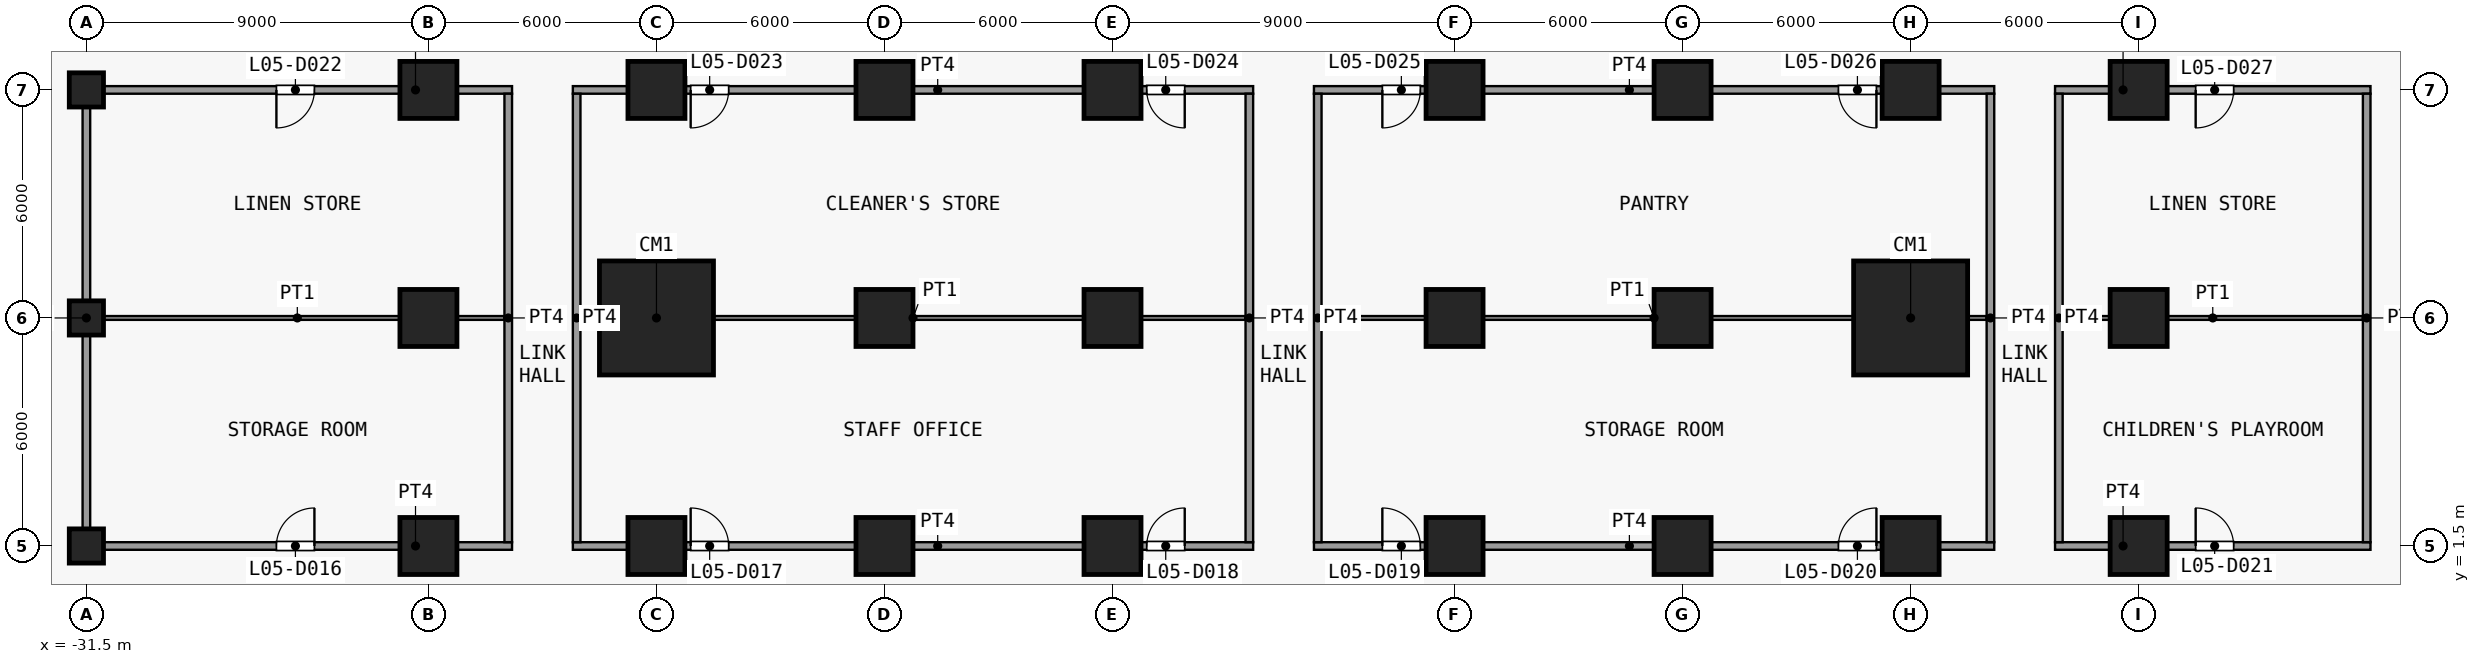
"""IFC4 building model, lengths in metres.
Left out: names, types, materials, properties, quantities, classifications, styles, units other than length and angle.
Written with IfcOpenShell. Run it as: python <this file> out.ifc"""

import sys

from ifc_helpers import new_model, si_unit, direction, frame, frame_2d, origin, origin_2d, place, context, subcontext, project, spatial, rectangle, extrude, element, fill, save


model = new_model("IFC4")
c1 = context("Model", 3, precision=1e-05, world=origin(), true_north=direction((0.0, 1.0)))
c2 = subcontext(c1, "Body", "Model", "MODEL_VIEW")
j1 = project(units=[si_unit("LENGTHUNIT", "METRE"), si_unit("PLANEANGLEUNIT", "RADIAN")], contexts=[c1])
p1 = place(None, origin())
s1 = spatial("IfcSite", under=j1, at=p1, CompositionType="ELEMENT")
p2 = place(p1, origin())
s2 = spatial("IfcBuilding", under=s1, at=p2, CompositionType="ELEMENT")
p3 = place(p2, frame((0.0, 0.0, 28.0)))
s3 = spatial("IfcBuildingStorey", under=s2, at=p3, CompositionType="ELEMENT", Elevation=28.0)
for number, where, z_axis, x_axis in (
    (1, (-31.5, 1.5, 0.0), (0.0, 0.0, 1.0), (1.0, 0.0, 0.0)),
    (2, (-31.5, 7.5, 0.0), (0.0, 0.0, 1.0), (1.0, 0.0, 0.0)),
    (3, (-31.5, 13.5, 0.0), (0.0, 0.0, 1.0), (1.0, 0.0, 0.0)),
):
    element("IfcColumn", number, at=place(p3, frame(where, z_axis=z_axis, x_axis=x_axis)), inside=s3, PredefinedType="COLUMN", context=c2, shape_type="SweptSolid", body=[
        extrude(rectangle(XDim=0.9, YDim=0.9, at=origin_2d()), origin(), (0.0, 0.0, 1.0), 4.5),
    ])
for number, where, z_axis, x_axis in (
    (4, (-22.5, 1.5, 0.0), (0.0, 0.0, 1.0), (1.0, 0.0, 0.0)),
    (5, (-22.5, 7.5, 0.0), (0.0, 0.0, 1.0), (1.0, 0.0, 0.0)),
    (6, (-22.5, 13.5, 0.0), (0.0, 0.0, 1.0), (1.0, 0.0, 0.0)),
    (7, (-16.5, 1.5, 0.0), (0.0, 0.0, 1.0), (1.0, 0.0, 0.0)),
):
    element("IfcColumn", number, at=place(p3, frame(where, z_axis=z_axis, x_axis=x_axis)), inside=s3, PredefinedType="COLUMN", context=c2, shape_type="SweptSolid", body=[
        extrude(rectangle(XDim=1.5, YDim=1.5, at=origin_2d()), origin(), (0.0, 0.0, 1.0), 4.5),
    ])
p4 = place(p3, frame((-16.5, 7.5, 0.0), z_axis=(0.0, 0.0, 1.0), x_axis=(1.0, 0.0, 0.0)))
e8 = element("IfcColumn", 8, at=p4, inside=s3, PredefinedType="COLUMN", context=c2, shape_type="SweptSolid", body=[
    extrude(rectangle(XDim=3.0, YDim=3.0, at=origin_2d()), origin(), (0.0, 0.0, 1.0), 4.5),
])
for number, where, z_axis, x_axis in (
    (9, (-16.5, 13.5, 0.0), (0.0, 0.0, 1.0), (1.0, 0.0, 0.0)),
    (10, (-10.5, 1.5, 0.0), (0.0, 0.0, 1.0), (1.0, 0.0, 0.0)),
    (11, (-10.5, 7.5, 0.0), (0.0, 0.0, 1.0), (1.0, 0.0, 0.0)),
    (12, (-10.5, 13.5, 0.0), (0.0, 0.0, 1.0), (1.0, 0.0, 0.0)),
    (13, (-4.5, 1.5, 0.0), (0.0, 0.0, 1.0), (1.0, 0.0, 0.0)),
    (14, (-4.5, 7.5, 0.0), (0.0, 0.0, 1.0), (1.0, 0.0, 0.0)),
    (15, (-4.5, 13.5, 0.0), (0.0, 0.0, 1.0), (1.0, 0.0, 0.0)),
    (16, (4.5, 1.5, 0.0), (0.0, 0.0, 1.0), (1.0, 0.0, 0.0)),
    (17, (4.5, 7.5, 0.0), (0.0, 0.0, 1.0), (1.0, 0.0, 0.0)),
    (18, (4.5, 13.5, 0.0), (0.0, 0.0, 1.0), (1.0, 0.0, 0.0)),
    (19, (10.5, 1.5, 0.0), (0.0, 0.0, 1.0), (1.0, 0.0, 0.0)),
    (20, (10.5, 7.5, 0.0), (0.0, 0.0, 1.0), (1.0, 0.0, 0.0)),
    (21, (10.5, 13.5, 0.0), (0.0, 0.0, 1.0), (1.0, 0.0, 0.0)),
    (22, (16.5, 1.5, 0.0), (0.0, 0.0, 1.0), (1.0, 0.0, 0.0)),
):
    element("IfcColumn", number, at=place(p3, frame(where, z_axis=z_axis, x_axis=x_axis)), inside=s3, PredefinedType="COLUMN", context=c2, shape_type="SweptSolid", body=[
        extrude(rectangle(XDim=1.5, YDim=1.5, at=origin_2d()), origin(), (0.0, 0.0, 1.0), 4.5),
    ])
p5 = place(p3, frame((16.5, 7.5, 0.0), z_axis=(0.0, 0.0, 1.0), x_axis=(1.0, 0.0, 0.0)))
e23 = element("IfcColumn", 23, at=p5, inside=s3, PredefinedType="COLUMN", context=c2, shape_type="SweptSolid", body=[
    extrude(rectangle(XDim=3.0, YDim=3.0, at=origin_2d()), origin(), (0.0, 0.0, 1.0), 4.5),
])
for number, where, z_axis, x_axis in (
    (24, (16.5, 13.5, 0.0), (0.0, 0.0, 1.0), (1.0, 0.0, 0.0)),
    (25, (22.5, 1.5, 0.0), (0.0, 0.0, 1.0), (1.0, 0.0, 0.0)),
    (26, (22.5, 7.5, 0.0), (0.0, 0.0, 1.0), (1.0, 0.0, 0.0)),
    (27, (22.5, 13.5, 0.0), (0.0, 0.0, 1.0), (1.0, 0.0, 0.0)),
):
    element("IfcColumn", number, at=place(p3, frame(where, z_axis=z_axis, x_axis=x_axis)), inside=s3, PredefinedType="COLUMN", context=c2, shape_type="SweptSolid", body=[
        extrude(rectangle(XDim=1.5, YDim=1.5, at=origin_2d()), origin(), (0.0, 0.0, 1.0), 4.5),
    ])
p6 = place(p3, frame((-31.6, 1.5, 0.0), z_axis=(0.0, 0.0, 1.0), x_axis=(1.0, 0.0, 0.0)))
e28 = element("IfcWall", 28, at=p6, inside=s3, PredefinedType="PARTITIONING", context=c2, shape_type="SweptSolid", body=[
    extrude(rectangle(XDim=11.3, YDim=0.2, at=frame_2d((5.65, 0.0))), origin(), (0.0, 0.0, 1.0), 4.1),
])
p7 = place(p6, frame((5.1, 0.0, 0.0)))
e29 = element("IfcOpeningElement", 29, at=p7, cuts=e28, PredefinedType="OPENING", context=c2, shape_type="SweptSolid", body=[
    extrude(rectangle(XDim=1.0, YDim=2.1, at=frame_2d((0.5, 1.05))), frame((0.0, 0.11, 0.0), z_axis=(0.0, -1.0, 0.0), x_axis=(1.0, 0.0, 0.0)), (0.0, 0.0, 1.0), 0.22),
])
p8 = place(p3, frame((-18.7, 1.5, 0.0), z_axis=(0.0, 0.0, 1.0), x_axis=(1.0, 0.0, 0.0)))
e30 = element("IfcWall", 30, at=p8, inside=s3, PredefinedType="PARTITIONING", context=c2, shape_type="SweptSolid", body=[
    extrude(rectangle(XDim=17.9, YDim=0.2, at=frame_2d((8.95, 0.0))), origin(), (0.0, 0.0, 1.0), 4.1),
])
p9 = place(p8, frame((3.1, 0.0, 0.0)))
e31 = element("IfcOpeningElement", 31, at=p9, cuts=e30, PredefinedType="OPENING", context=c2, shape_type="SweptSolid", body=[
    extrude(rectangle(XDim=1.0, YDim=2.1, at=frame_2d((0.5, 1.05))), frame((0.0, 0.11, 0.0), z_axis=(0.0, -1.0, 0.0), x_axis=(1.0, 0.0, 0.0)), (0.0, 0.0, 1.0), 0.22),
])
p10 = place(p8, frame((15.1, 0.0, 0.0)))
e32 = element("IfcOpeningElement", 32, at=p10, cuts=e30, PredefinedType="OPENING", context=c2, shape_type="SweptSolid", body=[
    extrude(rectangle(XDim=1.0, YDim=2.1, at=frame_2d((0.5, 1.05))), frame((0.0, 0.11, 0.0), z_axis=(0.0, -1.0, 0.0), x_axis=(1.0, 0.0, 0.0)), (0.0, 0.0, 1.0), 0.22),
])
p11 = place(p3, frame((0.8, 1.5, 0.0), z_axis=(0.0, 0.0, 1.0), x_axis=(1.0, 0.0, 0.0)))
e33 = element("IfcWall", 33, at=p11, inside=s3, PredefinedType="PARTITIONING", context=c2, shape_type="SweptSolid", body=[
    extrude(rectangle(XDim=17.9, YDim=0.2, at=frame_2d((8.95, 0.0))), origin(), (0.0, 0.0, 1.0), 4.1),
])
p12 = place(p11, frame((1.8, 0.0, 0.0)))
e34 = element("IfcOpeningElement", 34, at=p12, cuts=e33, PredefinedType="OPENING", context=c2, shape_type="SweptSolid", body=[
    extrude(rectangle(XDim=1.0, YDim=2.1, at=frame_2d((0.5, 1.05))), frame((0.0, 0.11, 0.0), z_axis=(0.0, -1.0, 0.0), x_axis=(1.0, 0.0, 0.0)), (0.0, 0.0, 1.0), 0.22),
])
p13 = place(p11, frame((13.8, 0.0, 0.0)))
e35 = element("IfcOpeningElement", 35, at=p13, cuts=e33, PredefinedType="OPENING", context=c2, shape_type="SweptSolid", body=[
    extrude(rectangle(XDim=1.0, YDim=2.1, at=frame_2d((0.5, 1.05))), frame((0.0, 0.11, 0.0), z_axis=(0.0, -1.0, 0.0), x_axis=(1.0, 0.0, 0.0)), (0.0, 0.0, 1.0), 0.22),
])
p14 = place(p3, frame((20.3, 1.5, 0.0), z_axis=(0.0, 0.0, 1.0), x_axis=(1.0, 0.0, 0.0)))
e36 = element("IfcWall", 36, at=p14, inside=s3, PredefinedType="PARTITIONING", context=c2, shape_type="SweptSolid", body=[
    extrude(rectangle(XDim=8.3, YDim=0.2, at=frame_2d((4.15, 0.0))), origin(), (0.0, 0.0, 1.0), 4.1),
])
p15 = place(p14, frame((3.7, 0.0, 0.0)))
e37 = element("IfcOpeningElement", 37, at=p15, cuts=e36, PredefinedType="OPENING", context=c2, shape_type="SweptSolid", body=[
    extrude(rectangle(XDim=1.0, YDim=2.1, at=frame_2d((0.5, 1.05))), frame((0.0, 0.11, 0.0), z_axis=(0.0, -1.0, 0.0), x_axis=(1.0, 0.0, 0.0)), (0.0, 0.0, 1.0), 0.22),
])
p16 = place(p3, frame((-31.4, 7.5, 0.0), z_axis=(0.0, 0.0, 1.0), x_axis=(1.0, 0.0, 0.0)))
e38 = element("IfcWall", 38, at=p16, inside=s3, PredefinedType="PARTITIONING", context=c2, shape_type="SweptSolid", body=[
    extrude(rectangle(XDim=10.9, YDim=0.1, at=frame_2d((5.45, 0.0))), origin(), (0.0, 0.0, 1.0), 4.1),
])
for number, where, z_axis, x_axis in (
    (39, (-18.5, 7.5, 0.0), (0.0, 0.0, 1.0), (1.0, 0.0, 0.0)),
    (40, (1.0, 7.5, 0.0), (0.0, 0.0, 1.0), (1.0, 0.0, 0.0)),
):
    element("IfcWall", number, at=place(p3, frame(where, z_axis=z_axis, x_axis=x_axis)), inside=s3, PredefinedType="PARTITIONING", context=c2, shape_type="SweptSolid", body=[
        extrude(rectangle(XDim=17.5, YDim=0.1, at=frame_2d((8.75, 0.0))), origin(), (0.0, 0.0, 1.0), 4.1),
    ])
p17 = place(p3, frame((20.5, 7.5, 0.0), z_axis=(0.0, 0.0, 1.0), x_axis=(1.0, 0.0, 0.0)))
e41 = element("IfcWall", 41, at=p17, inside=s3, PredefinedType="PARTITIONING", context=c2, shape_type="SweptSolid", body=[
    extrude(rectangle(XDim=7.9, YDim=0.1, at=frame_2d((3.95, 0.0))), origin(), (0.0, 0.0, 1.0), 4.1),
])
p18 = place(p3, frame((-31.6, 13.5, 0.0), z_axis=(0.0, 0.0, 1.0), x_axis=(1.0, 0.0, 0.0)))
e42 = element("IfcWall", 42, at=p18, inside=s3, PredefinedType="PARTITIONING", context=c2, shape_type="SweptSolid", body=[
    extrude(rectangle(XDim=11.3, YDim=0.2, at=frame_2d((5.65, 0.0))), origin(), (0.0, 0.0, 1.0), 4.1),
])
p19 = place(p18, frame((5.1, 0.0, 0.0)))
e43 = element("IfcOpeningElement", 43, at=p19, cuts=e42, PredefinedType="OPENING", context=c2, shape_type="SweptSolid", body=[
    extrude(rectangle(XDim=1.0, YDim=2.1, at=frame_2d((0.5, 1.05))), frame((0.0, 0.11, 0.0), z_axis=(0.0, -1.0, 0.0), x_axis=(1.0, 0.0, 0.0)), (0.0, 0.0, 1.0), 0.22),
])
p20 = place(p3, frame((-18.7, 13.5, 0.0), z_axis=(0.0, 0.0, 1.0), x_axis=(1.0, 0.0, 0.0)))
e44 = element("IfcWall", 44, at=p20, inside=s3, PredefinedType="PARTITIONING", context=c2, shape_type="SweptSolid", body=[
    extrude(rectangle(XDim=17.9, YDim=0.2, at=frame_2d((8.95, 0.0))), origin(), (0.0, 0.0, 1.0), 4.1),
])
p21 = place(p20, frame((3.1, 0.0, 0.0)))
e45 = element("IfcOpeningElement", 45, at=p21, cuts=e44, PredefinedType="OPENING", context=c2, shape_type="SweptSolid", body=[
    extrude(rectangle(XDim=1.0, YDim=2.1, at=frame_2d((0.5, 1.05))), frame((0.0, 0.11, 0.0), z_axis=(0.0, -1.0, 0.0), x_axis=(1.0, 0.0, 0.0)), (0.0, 0.0, 1.0), 0.22),
])
p22 = place(p20, frame((15.1, 0.0, 0.0)))
e46 = element("IfcOpeningElement", 46, at=p22, cuts=e44, PredefinedType="OPENING", context=c2, shape_type="SweptSolid", body=[
    extrude(rectangle(XDim=1.0, YDim=2.1, at=frame_2d((0.5, 1.05))), frame((0.0, 0.11, 0.0), z_axis=(0.0, -1.0, 0.0), x_axis=(1.0, 0.0, 0.0)), (0.0, 0.0, 1.0), 0.22),
])
p23 = place(p3, frame((0.8, 13.5, 0.0), z_axis=(0.0, 0.0, 1.0), x_axis=(1.0, 0.0, 0.0)))
e47 = element("IfcWall", 47, at=p23, inside=s3, PredefinedType="PARTITIONING", context=c2, shape_type="SweptSolid", body=[
    extrude(rectangle(XDim=17.9, YDim=0.2, at=frame_2d((8.95, 0.0))), origin(), (0.0, 0.0, 1.0), 4.1),
])
p24 = place(p23, frame((1.8, 0.0, 0.0)))
e48 = element("IfcOpeningElement", 48, at=p24, cuts=e47, PredefinedType="OPENING", context=c2, shape_type="SweptSolid", body=[
    extrude(rectangle(XDim=1.0, YDim=2.1, at=frame_2d((0.5, 1.05))), frame((0.0, 0.11, 0.0), z_axis=(0.0, -1.0, 0.0), x_axis=(1.0, 0.0, 0.0)), (0.0, 0.0, 1.0), 0.22),
])
p25 = place(p23, frame((13.8, 0.0, 0.0)))
e49 = element("IfcOpeningElement", 49, at=p25, cuts=e47, PredefinedType="OPENING", context=c2, shape_type="SweptSolid", body=[
    extrude(rectangle(XDim=1.0, YDim=2.1, at=frame_2d((0.5, 1.05))), frame((0.0, 0.11, 0.0), z_axis=(0.0, -1.0, 0.0), x_axis=(1.0, 0.0, 0.0)), (0.0, 0.0, 1.0), 0.22),
])
p26 = place(p3, frame((20.3, 13.5, 0.0), z_axis=(0.0, 0.0, 1.0), x_axis=(1.0, 0.0, 0.0)))
e50 = element("IfcWall", 50, at=p26, inside=s3, PredefinedType="PARTITIONING", context=c2, shape_type="SweptSolid", body=[
    extrude(rectangle(XDim=8.3, YDim=0.2, at=frame_2d((4.15, 0.0))), origin(), (0.0, 0.0, 1.0), 4.1),
])
p27 = place(p26, frame((3.7, 0.0, 0.0)))
e51 = element("IfcOpeningElement", 51, at=p27, cuts=e50, PredefinedType="OPENING", context=c2, shape_type="SweptSolid", body=[
    extrude(rectangle(XDim=1.0, YDim=2.1, at=frame_2d((0.5, 1.05))), frame((0.0, 0.11, 0.0), z_axis=(0.0, -1.0, 0.0), x_axis=(1.0, 0.0, 0.0)), (0.0, 0.0, 1.0), 0.22),
])
for number, where, z_axis, x_axis in (
    (52, (-31.5, 1.6, 0.0), (0.0, 0.0, 1.0), (0.0, 1.0, 0.0)),
    (53, (-20.4, 1.6, 0.0), (0.0, 0.0, 1.0), (0.0, 1.0, 0.0)),
    (54, (-18.6, 1.6, 0.0), (0.0, 0.0, 1.0), (0.0, 1.0, 0.0)),
    (55, (-0.9, 1.6, 0.0), (0.0, 0.0, 1.0), (0.0, 1.0, 0.0)),
    (56, (0.9, 1.6, 0.0), (0.0, 0.0, 1.0), (0.0, 1.0, 0.0)),
    (57, (18.6, 1.6, 0.0), (0.0, 0.0, 1.0), (0.0, 1.0, 0.0)),
    (58, (20.4, 1.6, 0.0), (0.0, 0.0, 1.0), (0.0, 1.0, 0.0)),
    (59, (28.5, 1.6, 0.0), (0.0, 0.0, 1.0), (0.0, 1.0, 0.0)),
):
    element("IfcWall", number, at=place(p3, frame(where, z_axis=z_axis, x_axis=x_axis)), inside=s3, PredefinedType="PARTITIONING", context=c2, shape_type="SweptSolid", body=[
        extrude(rectangle(XDim=11.8, YDim=0.2, at=frame_2d((5.9, 0.0))), origin(), (0.0, 0.0, 1.0), 4.1),
    ])
p28 = place(p7, origin())
e60 = element("IfcDoor", 60, at=p28, inside=s3, OperationType="SINGLE_SWING_LEFT", PredefinedType="DOOR", context=c2, shape_type="SweptSolid", body=[
    extrude(rectangle(XDim=1.0, YDim=2.1, at=frame_2d((0.5, 1.05))), frame((0.0, 0.025, 0.0), z_axis=(0.0, -1.0, 0.0), x_axis=(1.0, 0.0, 0.0)), (0.0, 0.0, 1.0), 0.05),
])
fill(e29, e60)
p29 = place(p9, origin())
e61 = element("IfcDoor", 61, at=p29, inside=s3, OperationType="SINGLE_SWING_RIGHT", PredefinedType="DOOR", context=c2, shape_type="SweptSolid", body=[
    extrude(rectangle(XDim=1.0, YDim=2.1, at=frame_2d((0.5, 1.05))), frame((0.0, 0.025, 0.0), z_axis=(0.0, -1.0, 0.0), x_axis=(1.0, 0.0, 0.0)), (0.0, 0.0, 1.0), 0.05),
])
fill(e31, e61)
p30 = place(p10, origin())
e62 = element("IfcDoor", 62, at=p30, inside=s3, OperationType="SINGLE_SWING_LEFT", PredefinedType="DOOR", context=c2, shape_type="SweptSolid", body=[
    extrude(rectangle(XDim=1.0, YDim=2.1, at=frame_2d((0.5, 1.05))), frame((0.0, 0.025, 0.0), z_axis=(0.0, -1.0, 0.0), x_axis=(1.0, 0.0, 0.0)), (0.0, 0.0, 1.0), 0.05),
])
fill(e32, e62)
p31 = place(p12, origin())
e63 = element("IfcDoor", 63, at=p31, inside=s3, OperationType="SINGLE_SWING_RIGHT", PredefinedType="DOOR", context=c2, shape_type="SweptSolid", body=[
    extrude(rectangle(XDim=1.0, YDim=2.1, at=frame_2d((0.5, 1.05))), frame((0.0, 0.025, 0.0), z_axis=(0.0, -1.0, 0.0), x_axis=(1.0, 0.0, 0.0)), (0.0, 0.0, 1.0), 0.05),
])
fill(e34, e63)
p32 = place(p13, origin())
e64 = element("IfcDoor", 64, at=p32, inside=s3, OperationType="SINGLE_SWING_LEFT", PredefinedType="DOOR", context=c2, shape_type="SweptSolid", body=[
    extrude(rectangle(XDim=1.0, YDim=2.1, at=frame_2d((0.5, 1.05))), frame((0.0, 0.025, 0.0), z_axis=(0.0, -1.0, 0.0), x_axis=(1.0, 0.0, 0.0)), (0.0, 0.0, 1.0), 0.05),
])
fill(e35, e64)
p33 = place(p15, origin())
e65 = element("IfcDoor", 65, at=p33, inside=s3, OperationType="SINGLE_SWING_RIGHT", PredefinedType="DOOR", context=c2, shape_type="SweptSolid", body=[
    extrude(rectangle(XDim=1.0, YDim=2.1, at=frame_2d((0.5, 1.05))), frame((0.0, 0.025, 0.0), z_axis=(0.0, -1.0, 0.0), x_axis=(1.0, 0.0, 0.0)), (0.0, 0.0, 1.0), 0.05),
])
fill(e37, e65)
p34 = place(p19, origin())
e66 = element("IfcDoor", 66, at=p34, inside=s3, OperationType="SINGLE_SWING_LEFT", PredefinedType="DOOR", context=c2, shape_type="SweptSolid", body=[
    extrude(rectangle(XDim=1.0, YDim=2.1, at=frame_2d((0.5, 1.05))), frame((0.0, 0.025, 0.0), z_axis=(0.0, -1.0, 0.0), x_axis=(1.0, 0.0, 0.0)), (0.0, 0.0, 1.0), 0.05),
])
fill(e43, e66)
p35 = place(p21, origin())
e67 = element("IfcDoor", 67, at=p35, inside=s3, OperationType="SINGLE_SWING_LEFT", PredefinedType="DOOR", context=c2, shape_type="SweptSolid", body=[
    extrude(rectangle(XDim=1.0, YDim=2.1, at=frame_2d((0.5, 1.05))), frame((0.0, 0.025, 0.0), z_axis=(0.0, -1.0, 0.0), x_axis=(1.0, 0.0, 0.0)), (0.0, 0.0, 1.0), 0.05),
])
fill(e45, e67)
p36 = place(p22, origin())
e68 = element("IfcDoor", 68, at=p36, inside=s3, OperationType="SINGLE_SWING_RIGHT", PredefinedType="DOOR", context=c2, shape_type="SweptSolid", body=[
    extrude(rectangle(XDim=1.0, YDim=2.1, at=frame_2d((0.5, 1.05))), frame((0.0, 0.025, 0.0), z_axis=(0.0, -1.0, 0.0), x_axis=(1.0, 0.0, 0.0)), (0.0, 0.0, 1.0), 0.05),
])
fill(e46, e68)
p37 = place(p24, origin())
e69 = element("IfcDoor", 69, at=p37, inside=s3, OperationType="SINGLE_SWING_LEFT", PredefinedType="DOOR", context=c2, shape_type="SweptSolid", body=[
    extrude(rectangle(XDim=1.0, YDim=2.1, at=frame_2d((0.5, 1.05))), frame((0.0, 0.025, 0.0), z_axis=(0.0, -1.0, 0.0), x_axis=(1.0, 0.0, 0.0)), (0.0, 0.0, 1.0), 0.05),
])
fill(e48, e69)
p38 = place(p25, origin())
e70 = element("IfcDoor", 70, at=p38, inside=s3, OperationType="SINGLE_SWING_RIGHT", PredefinedType="DOOR", context=c2, shape_type="SweptSolid", body=[
    extrude(rectangle(XDim=1.0, YDim=2.1, at=frame_2d((0.5, 1.05))), frame((0.0, 0.025, 0.0), z_axis=(0.0, -1.0, 0.0), x_axis=(1.0, 0.0, 0.0)), (0.0, 0.0, 1.0), 0.05),
])
fill(e49, e70)
p39 = place(p27, origin())
e71 = element("IfcDoor", 71, at=p39, inside=s3, OperationType="SINGLE_SWING_LEFT", PredefinedType="DOOR", context=c2, shape_type="SweptSolid", body=[
    extrude(rectangle(XDim=1.0, YDim=2.1, at=frame_2d((0.5, 1.05))), frame((0.0, 0.025, 0.0), z_axis=(0.0, -1.0, 0.0), x_axis=(1.0, 0.0, 0.0)), (0.0, 0.0, 1.0), 0.05),
])
fill(e51, e71)
save(model, sys.argv[1])
